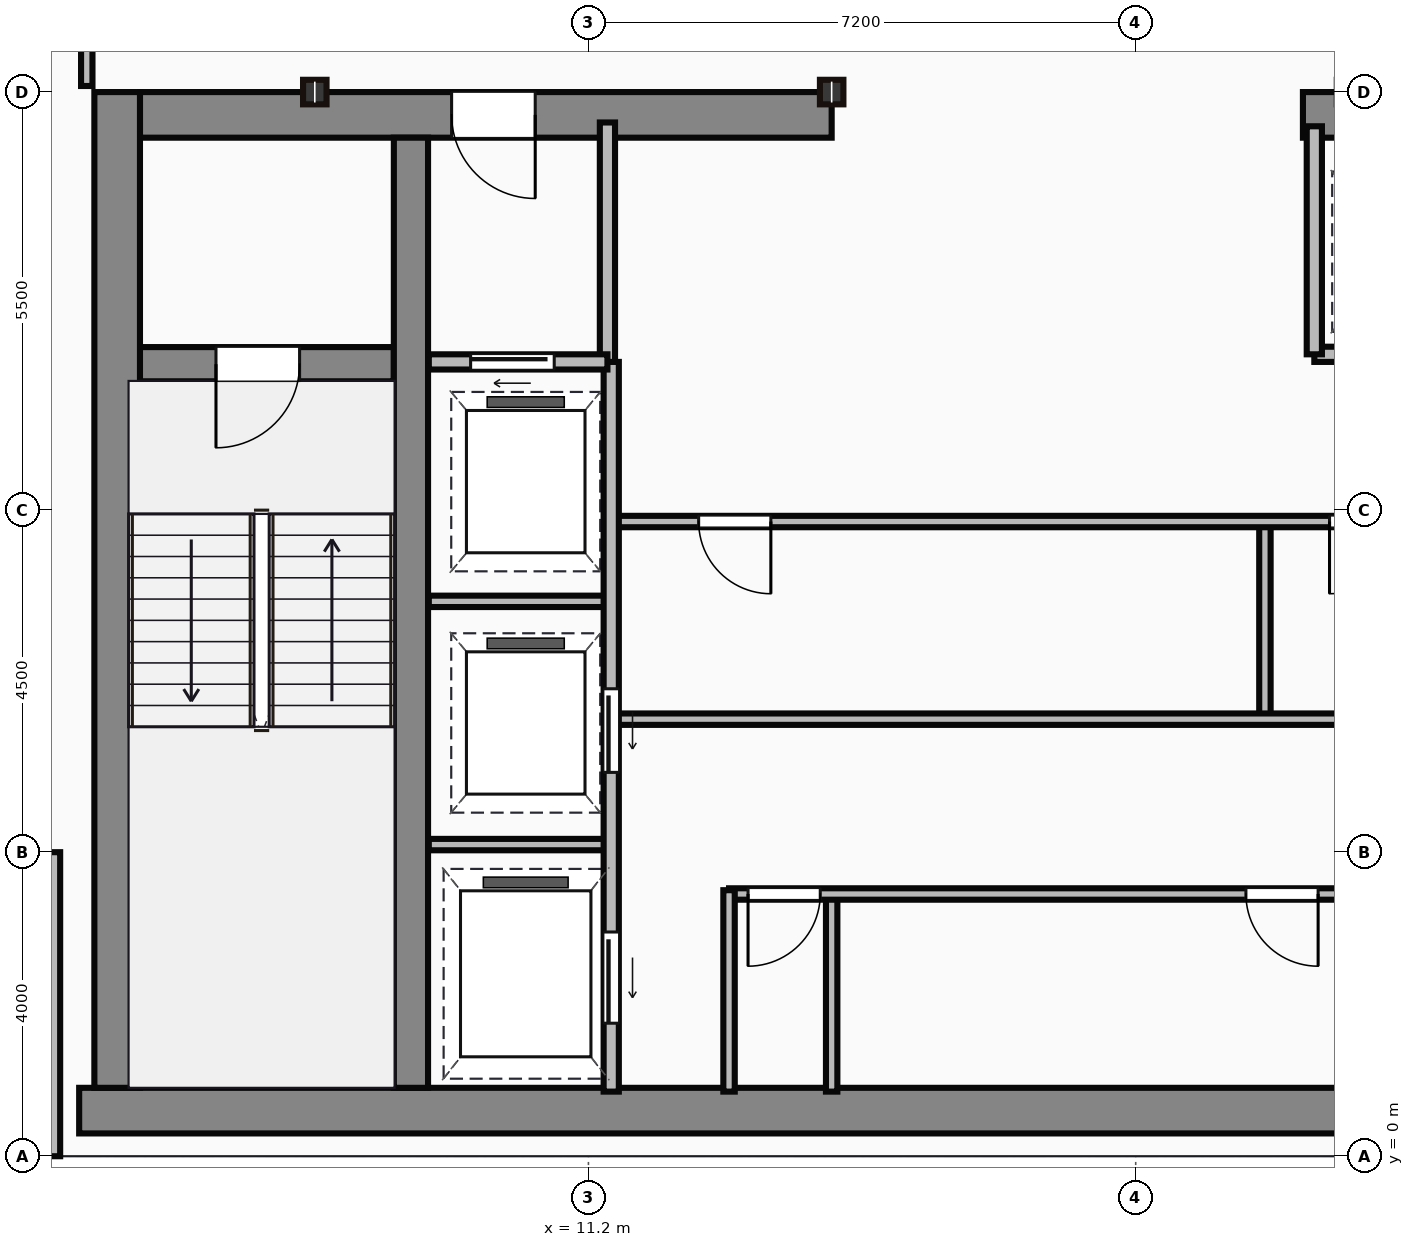
"""IFC4 building model, lengths in metres.
Left out: names, types, materials, properties, quantities, classifications, styles, units other than length and angle.
Written with IfcOpenShell. Run it as: python <this file> out.ifc"""

import sys

from ifc_helpers import new_model, si_unit, direction, frame, frame_2d, origin, origin_2d, place, context, subcontext, project, spatial, rectangle, i_section, extrude, source, transform, mapped, element, fill, save


model = new_model("IFC4")
c1 = context("Model", 3, precision=1e-05, world=origin(), true_north=direction((0.0, 1.0)))
c2 = subcontext(c1, "Body", "Model", "MODEL_VIEW")
j1 = project(units=[si_unit("LENGTHUNIT", "METRE"), si_unit("PLANEANGLEUNIT", "RADIAN")], contexts=[c1])
p1 = place(None, origin())
s1 = spatial("IfcSite", under=j1, at=p1, CompositionType="ELEMENT")
p2 = place(p1, origin())
s2 = spatial("IfcBuilding", under=s1, at=p2, CompositionType="ELEMENT")
p3 = place(p2, frame((0.0, 0.0, 244.2)))
s3 = spatial("IfcBuildingStorey", under=s2, at=p3, CompositionType="ELEMENT", Elevation=244.2)
m1 = source(origin(), c2, "Body", "SweptSolid", [
    extrude(rectangle(XDim=29.5, YDim=0.6, at=frame_2d((14.75, 0.0))), origin(), (0.0, 0.0, 1.0), 3.65),
])
p4 = place(p3, frame((4.5, 0.6, 0.0), z_axis=(0.0, 0.0, 1.0), x_axis=(1.0, 0.0, 0.0)))
e1 = element("IfcWall", 1, at=p4, inside=s3, PredefinedType="SHEAR", context=c2, shape_type="MappedRepresentation", body=[
    mapped(m1, transform((0.0, 0.0, 0.0))),
])
m2 = source(origin(), c2, "Body", "SweptSolid", [
    extrude(rectangle(XDim=13.1, YDim=0.6, at=frame_2d((6.55, 0.0))), origin(), (0.0, 0.0, 1.0), 3.65),
])
p5 = place(p3, frame((5.0, 0.9, 0.0), z_axis=(0.0, 0.0, 1.0), x_axis=(0.0, 1.0, 0.0)))
e2 = element("IfcWall", 2, at=p5, inside=s3, PredefinedType="SHEAR", context=c2, shape_type="MappedRepresentation", body=[
    mapped(m2, transform((0.0, 0.0, 0.0))),
])
m3 = source(origin(), c2, "Body", "SweptSolid", [
    extrude(rectangle(XDim=9.1, YDim=0.6, at=frame_2d((4.55, 0.0))), origin(), (0.0, 0.0, 1.0), 3.65),
])
p6 = place(p3, frame((5.3, 13.7, 0.0), z_axis=(0.0, 0.0, 1.0), x_axis=(1.0, 0.0, 0.0)))
e3 = element("IfcWall", 3, at=p6, inside=s3, PredefinedType="SHEAR", context=c2, shape_type="MappedRepresentation", body=[
    mapped(m3, transform((0.0, 0.0, 0.0))),
])
p7 = place(p6, frame((4.1, 0.0, 0.0)))
e4 = element("IfcOpeningElement", 4, at=p7, cuts=e3, PredefinedType="OPENING", context=c2, shape_type="SweptSolid", body=[
    extrude(rectangle(XDim=1.1, YDim=2.15, at=frame_2d((0.55, 1.075))), frame((0.0, 0.31, 0.0), z_axis=(0.0, -1.0, 0.0), x_axis=(1.0, 0.0, 0.0)), (0.0, 0.0, 1.0), 0.62),
])
m4 = source(origin(), c2, "Body", "SweptSolid", [
    extrude(rectangle(XDim=12.6, YDim=0.6, at=frame_2d((6.3, 0.0))), origin(), (0.0, 0.0, 1.0), 3.65),
])
p8 = place(p3, frame((20.6, 13.7, 0.0), z_axis=(0.0, 0.0, 1.0), x_axis=(1.0, 0.0, 0.0)))
e5 = element("IfcWall", 5, at=p8, inside=s3, PredefinedType="SHEAR", context=c2, shape_type="MappedRepresentation", body=[
    mapped(m4, transform((0.0, 0.0, 0.0))),
])
p9 = place(p8, frame((9.25, 0.0, 0.0)))
e6 = element("IfcOpeningElement", 6, at=p9, cuts=e5, PredefinedType="OPENING", context=c2, shape_type="SweptSolid", body=[
    extrude(rectangle(XDim=1.1, YDim=2.15, at=frame_2d((0.55, 1.075))), frame((0.0, 0.31, 0.0), z_axis=(0.0, -1.0, 0.0), x_axis=(1.0, 0.0, 0.0)), (0.0, 0.0, 1.0), 0.62),
])
m5 = source(origin(), c2, "Body", "SweptSolid", [
    extrude(rectangle(XDim=12.5, YDim=0.45, at=frame_2d((6.25, 0.0))), origin(), (0.0, 0.0, 1.0), 3.65),
])
p10 = place(p3, frame((8.865, 0.9, 0.0), z_axis=(0.0, 0.0, 1.0), x_axis=(0.0, 1.0, 0.0)))
e7 = element("IfcWall", 7, at=p10, inside=s3, PredefinedType="SHEAR", context=c2, shape_type="MappedRepresentation", body=[
    mapped(m5, transform((0.0, 0.0, 0.0))),
])
m6 = source(origin(), c2, "Body", "SweptSolid", [
    extrude(rectangle(XDim=3.39, YDim=0.45, at=frame_2d((1.695, 0.0))), origin(), (0.0, 0.0, 1.0), 3.65),
])
p11 = place(p3, frame((5.25, 10.42, 0.0), z_axis=(0.0, 0.0, 1.0), x_axis=(1.0, 0.0, 0.0)))
e8 = element("IfcWall", 8, at=p11, inside=s3, PredefinedType="SHEAR", context=c2, shape_type="MappedRepresentation", body=[
    mapped(m6, transform((0.0, 0.0, 0.0))),
])
p12 = place(p11, frame((1.05, 0.0, 0.0)))
e9 = element("IfcOpeningElement", 9, at=p12, cuts=e8, PredefinedType="OPENING", context=c2, shape_type="SweptSolid", body=[
    extrude(rectangle(XDim=1.1, YDim=2.15, at=frame_2d((0.55, 1.075))), frame((0.0, 0.235, 0.0), z_axis=(0.0, -1.0, 0.0), x_axis=(1.0, 0.0, 0.0)), (0.0, 0.0, 1.0), 0.47),
])
m7 = source(origin(), c2, "Body", "SweptSolid", [
    extrude(i_section(OverallWidth=0.309, OverallDepth=0.323, WebThickness=0.014, FlangeThickness=0.023, at=origin_2d()), origin(), (0.0, 0.0, 1.0), 3.65),
])
for number, where, z_axis, x_axis in (
    (10, (7.6, 14.0, 0.0), (0.0, 0.0, 1.0), (1.0, 0.0, 0.0)),
    (11, (14.4, 14.0, 0.0), (0.0, 0.0, 1.0), (1.0, 0.0, 0.0)),
):
    element("IfcColumn", number, at=place(p3, frame(where, z_axis=z_axis, x_axis=x_axis)), inside=s3, PredefinedType="COLUMN", context=c2, shape_type="MappedRepresentation", body=[
        mapped(m7, transform((0.0, 0.0, 0.0))),
    ])
m8 = source(origin(), c2, "Body", "SweptSolid", [
    extrude(rectangle(XDim=4.0, YDim=0.25, at=frame_2d((2.0, 0.0))), origin(), (0.0, 0.0, 1.0), 3.4),
])
p13 = place(p3, frame((4.125, 4.0, 0.0), z_axis=(0.0, 0.0, 1.0), x_axis=(0.0, -1.0, 0.0)))
e12 = element("IfcWall", 12, at=p13, inside=s3, PredefinedType="STANDARD", context=c2, shape_type="MappedRepresentation", body=[
    mapped(m8, transform((0.0, 0.0, 0.0))),
])
m9 = source(origin(), c2, "Body", "SweptSolid", [
    extrude(rectangle(XDim=3.18, YDim=0.2, at=frame_2d((1.59, 0.0))), origin(), (0.0, 0.0, 1.0), 3.4),
])
p14 = place(p3, frame((11.45, 10.42, 0.0), z_axis=(0.0, 0.0, 1.0), x_axis=(0.0, 1.0, 0.0)))
e13 = element("IfcWall", 13, at=p14, inside=s3, PredefinedType="PARTITIONING", context=c2, shape_type="MappedRepresentation", body=[
    mapped(m9, transform((0.0, 0.0, 0.0))),
])
m10 = source(origin(), c2, "Body", "SweptSolid", [
    extrude(rectangle(XDim=2.35, YDim=0.2, at=frame_2d((1.175, 0.0))), origin(), (0.0, 0.0, 1.0), 3.4),
])
p15 = place(p3, frame((9.1, 10.45, 0.0), z_axis=(0.0, 0.0, 1.0), x_axis=(1.0, 0.0, 0.0)))
e14 = element("IfcWall", 14, at=p15, inside=s3, PredefinedType="PARTITIONING", context=c2, shape_type="MappedRepresentation", body=[
    mapped(m10, transform((0.0, 0.0, 0.0))),
])
p16 = place(p15, frame((0.55, 0.0, 0.0)))
e15 = element("IfcOpeningElement", 15, at=p16, cuts=e14, PredefinedType="OPENING", context=c2, shape_type="SweptSolid", body=[
    extrude(rectangle(XDim=1.1, YDim=2.15, at=frame_2d((0.55, 1.075))), frame((0.0, 0.11, 0.0), z_axis=(0.0, -1.0, 0.0), x_axis=(1.0, 0.0, 0.0)), (0.0, 0.0, 1.0), 0.22),
])
m11 = source(origin(), c2, "Body", "SweptSolid", [
    extrude(rectangle(XDim=9.6, YDim=0.2, at=frame_2d((4.8, 0.0))), origin(), (0.0, 0.0, 1.0), 3.4),
])
p17 = place(p3, frame((11.5, 0.85, 0.0), z_axis=(0.0, 0.0, 1.0), x_axis=(0.0, 1.0, 0.0)))
e16 = element("IfcWall", 16, at=p17, inside=s3, PredefinedType="PARTITIONING", context=c2, shape_type="MappedRepresentation", body=[
    mapped(m11, transform((0.0, 0.0, 0.0))),
])
p18 = place(p17, frame((4.2, 0.0, 0.0)))
e17 = element("IfcOpeningElement", 17, at=p18, cuts=e16, PredefinedType="OPENING", context=c2, shape_type="SweptSolid", body=[
    extrude(rectangle(XDim=1.1, YDim=2.15, at=frame_2d((0.55, 1.075))), frame((0.0, 0.11, 0.0), z_axis=(0.0, -1.0, 0.0), x_axis=(1.0, 0.0, 0.0)), (0.0, 0.0, 1.0), 0.22),
])
p19 = place(p17, frame((0.9, 0.0, 0.0)))
e18 = element("IfcOpeningElement", 18, at=p19, cuts=e16, PredefinedType="OPENING", context=c2, shape_type="SweptSolid", body=[
    extrude(rectangle(XDim=1.2, YDim=2.15, at=frame_2d((0.6, 1.075))), frame((0.0, 0.11, 0.0), z_axis=(0.0, -1.0, 0.0), x_axis=(1.0, 0.0, 0.0)), (0.0, 0.0, 1.0), 0.22),
])
m12 = source(origin(), c2, "Body", "SweptSolid", [
    extrude(rectangle(XDim=2.4, YDim=0.15, at=frame_2d((1.2, 0.0))), origin(), (0.0, 0.0, 1.0), 3.4),
])
for number, where, z_axis, x_axis in (
    (19, (9.1, 4.1, 0.0), (0.0, 0.0, 1.0), (1.0, 0.0, 0.0)),
    (20, (9.1, 7.3, 0.0), (0.0, 0.0, 1.0), (1.0, 0.0, 0.0)),
):
    element("IfcWall", number, at=place(p3, frame(where, z_axis=z_axis, x_axis=x_axis)), inside=s3, PredefinedType="PARTITIONING", context=c2, shape_type="MappedRepresentation", body=[
        mapped(m12, transform((0.0, 0.0, 0.0))),
    ])
m13 = source(origin(), c2, "Body", "SweptSolid", [
    extrude(rectangle(XDim=2.65, YDim=0.15, at=frame_2d((1.325, 0.0))), origin(), (0.0, 0.0, 1.0), 3.4),
])
p20 = place(p3, frame((13.05, 0.85, 0.0), z_axis=(0.0, 0.0, 1.0), x_axis=(0.0, 1.0, 0.0)))
e21 = element("IfcWall", 21, at=p20, inside=s3, PredefinedType="PARTITIONING", context=c2, shape_type="MappedRepresentation", body=[
    mapped(m13, transform((0.0, 0.0, 0.0))),
])
m14 = source(origin(), c2, "Body", "SweptSolid", [
    extrude(rectangle(XDim=10.35, YDim=0.15, at=frame_2d((5.175, 0.0))), origin(), (0.0, 0.0, 1.0), 3.4),
])
p21 = place(p3, frame((13.05, 3.45, 0.0), z_axis=(0.0, 0.0, 1.0), x_axis=(1.0, 0.0, 0.0)))
e22 = element("IfcWall", 22, at=p21, inside=s3, PredefinedType="PARTITIONING", context=c2, shape_type="MappedRepresentation", body=[
    mapped(m14, transform((0.0, 0.0, 0.0))),
])
p22 = place(p21, frame((0.25, 0.0, 0.0)))
e23 = element("IfcOpeningElement", 23, at=p22, cuts=e22, PredefinedType="OPENING", context=c2, shape_type="SweptSolid", body=[
    extrude(rectangle(XDim=0.95, YDim=2.15, at=frame_2d((0.475, 1.075))), frame((0.0, 0.085, 0.0), z_axis=(0.0, -1.0, 0.0), x_axis=(1.0, 0.0, 0.0)), (0.0, 0.0, 1.0), 0.17),
])
p23 = place(p21, frame((6.8, 0.0, 0.0)))
e24 = element("IfcOpeningElement", 24, at=p23, cuts=e22, PredefinedType="OPENING", context=c2, shape_type="SweptSolid", body=[
    extrude(rectangle(XDim=0.95, YDim=2.15, at=frame_2d((0.475, 1.075))), frame((0.0, 0.085, 0.0), z_axis=(0.0, -1.0, 0.0), x_axis=(1.0, 0.0, 0.0)), (0.0, 0.0, 1.0), 0.17),
])
m15 = source(origin(), c2, "Body", "SweptSolid", [
    extrude(rectangle(XDim=2.6, YDim=0.15, at=frame_2d((1.3, 0.0))), origin(), (0.0, 0.0, 1.0), 3.4),
])
p24 = place(p3, frame((14.4, 0.85, 0.0), z_axis=(0.0, 0.0, 1.0), x_axis=(0.0, 1.0, 0.0)))
e25 = element("IfcWall", 25, at=p24, inside=s3, PredefinedType="PARTITIONING", context=c2, shape_type="MappedRepresentation", body=[
    mapped(m15, transform((0.0, 0.0, 0.0))),
])
m16 = source(origin(), c2, "Body", "SweptSolid", [
    extrude(rectangle(XDim=11.85, YDim=0.15, at=frame_2d((5.925, 0.0))), origin(), (0.0, 0.0, 1.0), 3.4),
])
p25 = place(p3, frame((11.55, 5.75, 0.0), z_axis=(0.0, 0.0, 1.0), x_axis=(1.0, 0.0, 0.0)))
e26 = element("IfcWall", 26, at=p25, inside=s3, PredefinedType="PARTITIONING", context=c2, shape_type="MappedRepresentation", body=[
    mapped(m16, transform((0.0, 0.0, 0.0))),
])
p26 = place(p3, frame((11.55, 8.35, 0.0), z_axis=(0.0, 0.0, 1.0), x_axis=(1.0, 0.0, 0.0)))
e27 = element("IfcWall", 27, at=p26, inside=s3, PredefinedType="PARTITIONING", context=c2, shape_type="MappedRepresentation", body=[
    mapped(m16, transform((0.0, 0.0, 0.0))),
])
p27 = place(p26, frame((1.1, 0.0, 0.0)))
e28 = element("IfcOpeningElement", 28, at=p27, cuts=e27, PredefinedType="OPENING", context=c2, shape_type="SweptSolid", body=[
    extrude(rectangle(XDim=0.95, YDim=2.15, at=frame_2d((0.475, 1.075))), frame((0.0, 0.085, 0.0), z_axis=(0.0, -1.0, 0.0), x_axis=(1.0, 0.0, 0.0)), (0.0, 0.0, 1.0), 0.17),
])
p28 = place(p26, frame((9.4, 0.0, 0.0)))
e29 = element("IfcOpeningElement", 29, at=p28, cuts=e27, PredefinedType="OPENING", context=c2, shape_type="SweptSolid", body=[
    extrude(rectangle(XDim=0.95, YDim=2.15, at=frame_2d((0.475, 1.075))), frame((0.0, 0.085, 0.0), z_axis=(0.0, -1.0, 0.0), x_axis=(1.0, 0.0, 0.0)), (0.0, 0.0, 1.0), 0.17),
])
m17 = source(origin(), c2, "Body", "SweptSolid", [
    extrude(rectangle(XDim=2.5, YDim=0.15, at=frame_2d((1.25, 0.0))), origin(), (0.0, 0.0, 1.0), 3.4),
])
p29 = place(p3, frame((20.1, 5.8, 0.0), z_axis=(0.0, 0.0, 1.0), x_axis=(0.0, 1.0, 0.0)))
e30 = element("IfcWall", 30, at=p29, inside=s3, PredefinedType="PARTITIONING", context=c2, shape_type="MappedRepresentation", body=[
    mapped(m17, transform((0.0, 0.0, 0.0))),
])
m18 = source(origin(), c2, "Body", "SweptSolid", [
    extrude(rectangle(XDim=8.8, YDim=0.2, at=frame_2d((4.4, 0.0))), origin(), (0.0, 0.0, 1.0), 3.4),
])
p30 = place(p3, frame((20.75, 10.55, 0.0), z_axis=(0.0, 0.0, 1.0), x_axis=(1.0, 0.0, 0.0)))
e31 = element("IfcWall", 31, at=p30, inside=s3, PredefinedType="PARTITIONING", context=c2, shape_type="MappedRepresentation", body=[
    mapped(m18, transform((0.0, 0.0, 0.0))),
])
p31 = place(p30, frame((0.5, 0.0, 0.0)))
e32 = element("IfcOpeningElement", 32, at=p31, cuts=e31, PredefinedType="OPENING", context=c2, shape_type="SweptSolid", body=[
    extrude(rectangle(XDim=1.05, YDim=2.15, at=frame_2d((0.525, 1.075))), frame((0.0, 0.11, 0.0), z_axis=(0.0, -1.0, 0.0), x_axis=(1.0, 0.0, 0.0)), (0.0, 0.0, 1.0), 0.22),
])
p32 = place(p30, frame((2.6, 0.0, 0.0)))
e33 = element("IfcOpeningElement", 33, at=p32, cuts=e31, PredefinedType="OPENING", context=c2, shape_type="SweptSolid", body=[
    extrude(rectangle(XDim=1.05, YDim=2.15, at=frame_2d((0.525, 1.075))), frame((0.0, 0.11, 0.0), z_axis=(0.0, -1.0, 0.0), x_axis=(1.0, 0.0, 0.0)), (0.0, 0.0, 1.0), 0.22),
])
p33 = place(p30, frame((4.7, 0.0, 0.0)))
e34 = element("IfcOpeningElement", 34, at=p33, cuts=e31, PredefinedType="OPENING", context=c2, shape_type="SweptSolid", body=[
    extrude(rectangle(XDim=1.05, YDim=2.15, at=frame_2d((0.525, 1.075))), frame((0.0, 0.11, 0.0), z_axis=(0.0, -1.0, 0.0), x_axis=(1.0, 0.0, 0.0)), (0.0, 0.0, 1.0), 0.22),
])
p34 = place(p30, frame((6.8, 0.0, 0.0)))
e35 = element("IfcOpeningElement", 35, at=p34, cuts=e31, PredefinedType="OPENING", context=c2, shape_type="SweptSolid", body=[
    extrude(rectangle(XDim=1.05, YDim=2.15, at=frame_2d((0.525, 1.075))), frame((0.0, 0.11, 0.0), z_axis=(0.0, -1.0, 0.0), x_axis=(1.0, 0.0, 0.0)), (0.0, 0.0, 1.0), 0.22),
])
m19 = source(origin(), c2, "Body", "SweptSolid", [
    extrude(rectangle(XDim=3.0, YDim=0.2, at=frame_2d((1.5, 0.0))), origin(), (0.0, 0.0, 1.0), 3.4),
])
p35 = place(p3, frame((20.75, 10.55, 0.0), z_axis=(0.0, 0.0, 1.0), x_axis=(0.0, 1.0, 0.0)))
e36 = element("IfcWall", 36, at=p35, inside=s3, PredefinedType="PARTITIONING", context=c2, shape_type="MappedRepresentation", body=[
    mapped(m19, transform((0.0, 0.0, 0.0))),
])
m20 = source(origin(), c2, "Body", "SweptSolid", [
    extrude(rectangle(XDim=2.12, YDim=0.15, at=frame_2d((1.06, 0.0))), origin(), (0.0, 0.0, 1.0), 3.4),
])
p36 = place(p3, frame((4.6, 14.08, 0.0), z_axis=(0.0, 0.0, 1.0), x_axis=(0.0, 1.0, 0.0)))
e37 = element("IfcWall", 37, at=p36, inside=s3, PredefinedType="PARTITIONING", context=c2, shape_type="MappedRepresentation", body=[
    mapped(m20, transform((0.0, 0.0, 0.0))),
])
m21 = source(origin(), c2, "Body", "SweptSolid", [
    extrude(rectangle(XDim=1.1, YDim=2.15, at=frame_2d((0.55, 1.075))), frame((0.0, 0.025, 0.0), z_axis=(0.0, -1.0, 0.0), x_axis=(1.0, 0.0, 0.0)), (0.0, 0.0, 1.0), 0.05),
])
p37 = place(p12, frame((1.1, 0.0, 0.0), z_axis=(0.0, 0.0, 1.0), x_axis=(-1.0, 0.0, 0.0)))
e38 = element("IfcDoor", 38, at=p37, inside=s3, OperationType="SINGLE_SWING_LEFT", PredefinedType="DOOR", context=c2, shape_type="MappedRepresentation", body=[
    mapped(m21, transform((0.0, 0.0, 0.0))),
])
fill(e9, e38)
p38 = place(p7, origin())
e39 = element("IfcDoor", 39, at=p38, inside=s3, OperationType="SINGLE_SWING_RIGHT", PredefinedType="DOOR", context=c2, shape_type="MappedRepresentation", body=[
    mapped(m21, transform((0.0, 0.0, 0.0))),
])
fill(e4, e39)
p39 = place(p16, origin())
e40 = element("IfcDoor", 40, at=p39, inside=s3, OperationType="SLIDING_TO_LEFT", PredefinedType="DOOR", context=c2, shape_type="MappedRepresentation", body=[
    mapped(m21, transform((0.0, 0.0, 0.0))),
])
fill(e15, e40)
p40 = place(p18, frame((1.1, 0.0, 0.0), z_axis=(0.0, 0.0, 1.0), x_axis=(-1.0, 0.0, 0.0)))
e41 = element("IfcDoor", 41, at=p40, inside=s3, OperationType="SLIDING_TO_LEFT", PredefinedType="DOOR", context=c2, shape_type="MappedRepresentation", body=[
    mapped(m21, transform((0.0, 0.0, 0.0))),
])
fill(e17, e41)
m22 = source(origin(), c2, "Body", "SweptSolid", [
    extrude(rectangle(XDim=1.2, YDim=2.15, at=frame_2d((0.6, 1.075))), frame((0.0, 0.025, 0.0), z_axis=(0.0, -1.0, 0.0), x_axis=(1.0, 0.0, 0.0)), (0.0, 0.0, 1.0), 0.05),
])
p41 = place(p19, frame((1.2, 0.0, 0.0), z_axis=(0.0, 0.0, 1.0), x_axis=(-1.0, 0.0, 0.0)))
e42 = element("IfcDoor", 42, at=p41, inside=s3, OperationType="SLIDING_TO_LEFT", PredefinedType="DOOR", context=c2, shape_type="MappedRepresentation", body=[
    mapped(m22, transform((0.0, 0.0, 0.0))),
])
fill(e18, e42)
m23 = source(origin(), c2, "Body", "SweptSolid", [
    extrude(rectangle(XDim=0.95, YDim=2.15, at=frame_2d((0.475, 1.075))), frame((0.0, 0.025, 0.0), z_axis=(0.0, -1.0, 0.0), x_axis=(1.0, 0.0, 0.0)), (0.0, 0.0, 1.0), 0.05),
])
p42 = place(p22, origin())
e43 = element("IfcDoor", 43, at=p42, inside=s3, OperationType="SINGLE_SWING_LEFT", PredefinedType="DOOR", context=c2, shape_type="MappedRepresentation", body=[
    mapped(m23, transform((0.0, 0.0, 0.0))),
])
fill(e23, e43)
p43 = place(p23, origin())
e44 = element("IfcDoor", 44, at=p43, inside=s3, OperationType="SINGLE_SWING_RIGHT", PredefinedType="DOOR", context=c2, shape_type="MappedRepresentation", body=[
    mapped(m23, transform((0.0, 0.0, 0.0))),
])
fill(e24, e44)
p44 = place(p27, origin())
e45 = element("IfcDoor", 45, at=p44, inside=s3, OperationType="SINGLE_SWING_RIGHT", PredefinedType="DOOR", context=c2, shape_type="MappedRepresentation", body=[
    mapped(m23, transform((0.0, 0.0, 0.0))),
])
fill(e28, e45)
p45 = place(p28, origin())
e46 = element("IfcDoor", 46, at=p45, inside=s3, OperationType="SINGLE_SWING_LEFT", PredefinedType="DOOR", context=c2, shape_type="MappedRepresentation", body=[
    mapped(m23, transform((0.0, 0.0, 0.0))),
])
fill(e29, e46)
save(model, sys.argv[1])
